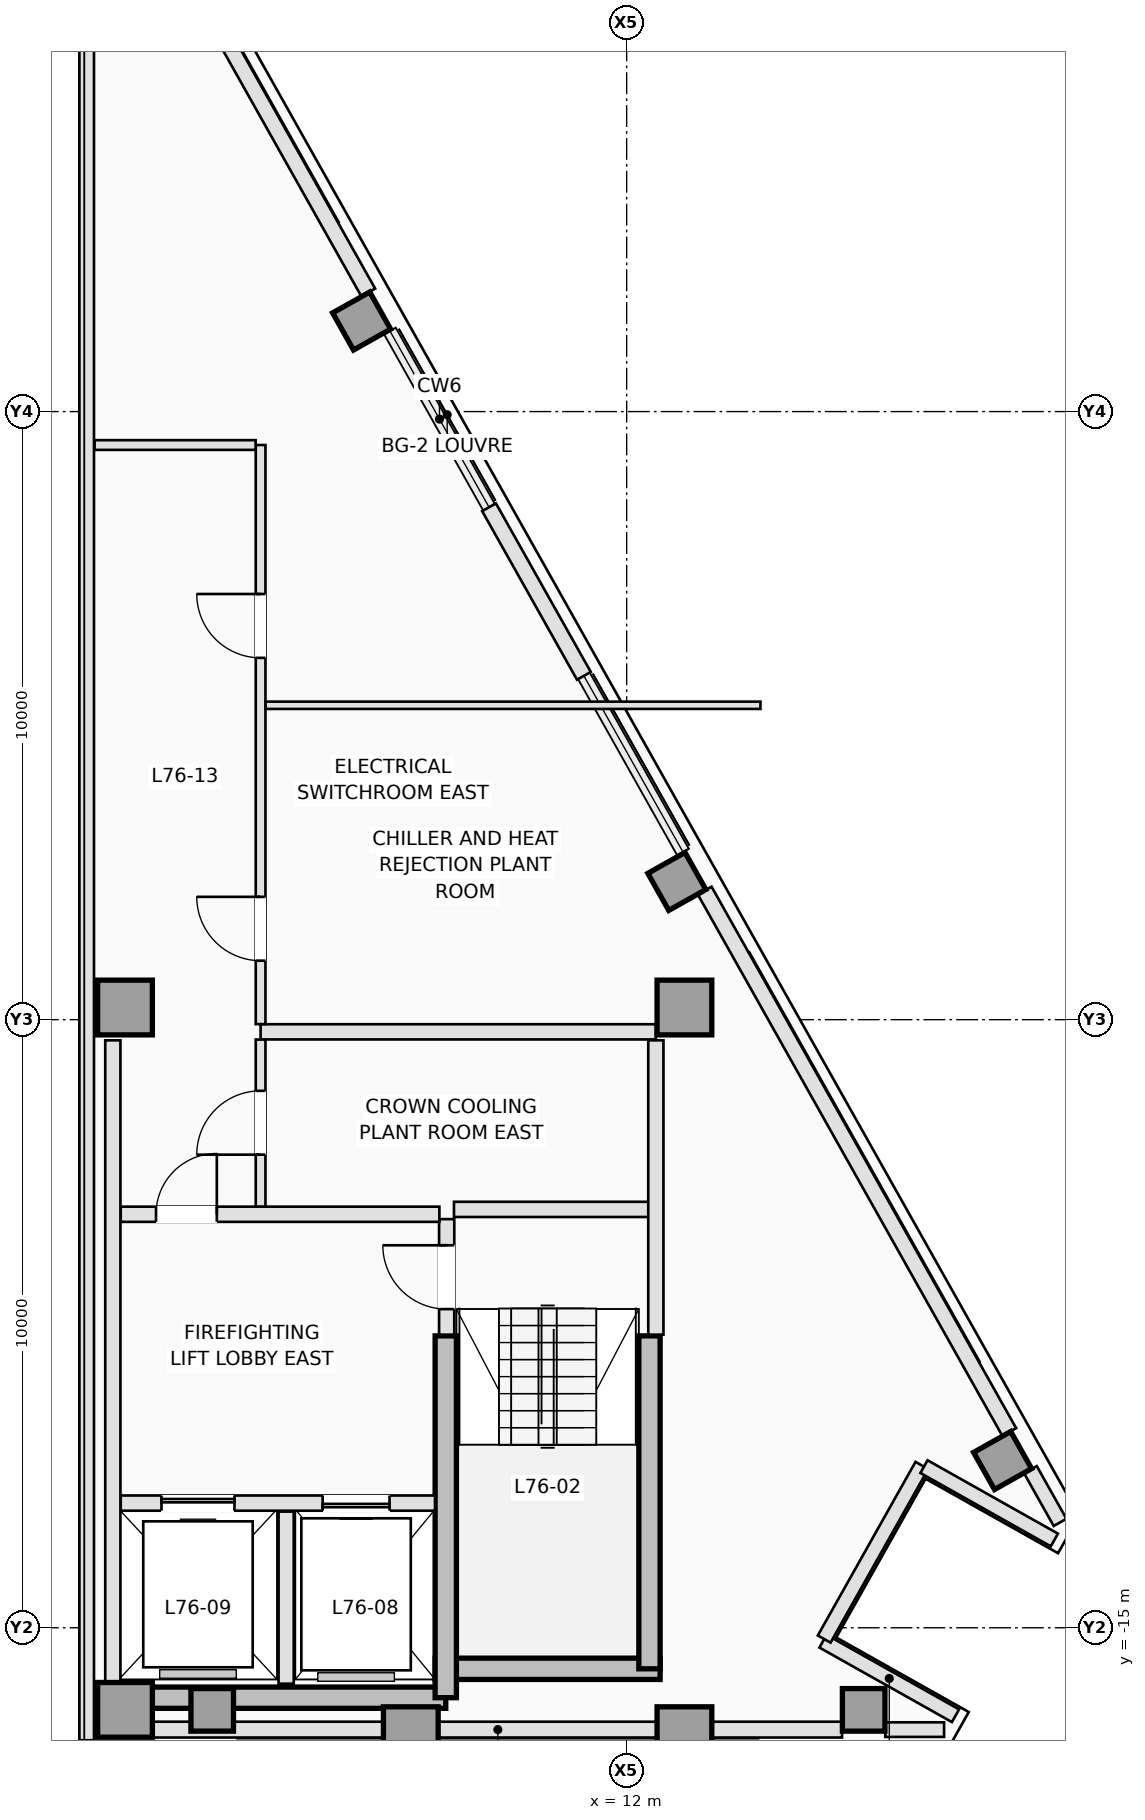
"""IFC4 building model, lengths in metres.
Left out: names, types, materials, properties, quantities, classifications, styles, units other than length and angle.
Written with IfcOpenShell. Run it as: python <this file> out.ifc"""

import sys

from ifc_helpers import new_model, si_unit, direction, frame, frame_2d, origin, origin_2d, place, context, subcontext, project, spatial, rectangle, extrude, element, fill, save


model = new_model("IFC4")
c1 = context("Model", 3, precision=1e-05, world=origin(), true_north=direction((0.0, 1.0)))
c2 = subcontext(c1, "Body", "Model", "MODEL_VIEW")
j1 = project(units=[si_unit("LENGTHUNIT", "METRE"), si_unit("PLANEANGLEUNIT", "RADIAN")], contexts=[c1])
p1 = place(None, origin())
s1 = spatial("IfcSite", under=j1, at=p1, CompositionType="ELEMENT")
p2 = place(p1, origin())
s2 = spatial("IfcBuilding", under=s1, at=p2, CompositionType="ELEMENT")
p3 = place(p2, frame((0.0, 0.0, 274.1)))
s3 = spatial("IfcBuildingStorey", under=s2, at=p3, CompositionType="ELEMENT", Elevation=274.1)
p4 = place(p3, frame((3.75, -16.15, 0.0), z_axis=(0.0, 0.0, 1.0), x_axis=(1.0, 0.0, 0.0)))
e1 = element("IfcWall", 1, at=p4, inside=s3, PredefinedType="SHEAR", context=c2, shape_type="SweptSolid", body=[
    extrude(rectangle(XDim=5.275, YDim=0.35, at=frame_2d((2.637, 0.0))), origin(), (0.0, 0.0, 1.0), 3.2),
])
p5 = place(p3, frame((8.85, -15.675, 0.0), z_axis=(0.0, 0.0, 1.0), x_axis=(1.0, 0.0, 0.0)))
e2 = element("IfcWall", 2, at=p5, inside=s3, PredefinedType="SHEAR", context=c2, shape_type="SweptSolid", body=[
    extrude(rectangle(XDim=3.7, YDim=0.35, at=frame_2d((1.85, 0.0))), origin(), (0.0, 0.0, 1.0), 3.2),
])
p6 = place(p3, frame((12.375, -15.675, 0.0), z_axis=(0.0, 0.0, 1.0), x_axis=(0.0, 1.0, 0.0)))
e3 = element("IfcWall", 3, at=p6, inside=s3, PredefinedType="SHEAR", context=c2, shape_type="SweptSolid", body=[
    extrude(rectangle(XDim=5.475, YDim=0.35, at=frame_2d((2.738, 0.0))), origin(), (0.0, 0.0, 1.0), 3.2),
])
p7 = place(p3, frame((9.025, -16.15, 0.0), z_axis=(0.0, 0.0, 1.0), x_axis=(0.0, 1.0, 0.0)))
e4 = element("IfcWall", 4, at=p7, inside=s3, PredefinedType="SHEAR", context=c2, shape_type="SweptSolid", body=[
    extrude(rectangle(XDim=5.95, YDim=0.35, at=frame_2d((2.975, 0.0))), origin(), (0.0, 0.0, 1.0), 3.2),
])
for number, where, z_axis, x_axis in (
    (5, (3.75, -16.35, 0.0), (0.0, 0.0, 1.0), (1.0, 0.0, 0.0)),
    (6, (8.45, -16.75, 0.0), (0.0, 0.0, 1.0), (1.0, 0.0, 0.0)),
    (7, (12.95, -16.75, 0.0), (0.0, 0.0, 1.0), (1.0, 0.0, 0.0)),
    (8, (3.75, -4.8, 0.0), (0.0, 0.0, 1.0), (1.0, 0.0, 0.0)),
    (9, (12.95, -4.8, 0.0), (0.0, 0.0, 1.0), (1.0, 0.0, 0.0)),
):
    element("IfcColumn", number, at=place(p3, frame(where, z_axis=z_axis, x_axis=x_axis)), inside=s3, PredefinedType="COLUMN", context=c2, shape_type="SweptSolid", body=[
        extrude(rectangle(XDim=0.9, YDim=0.9, at=origin_2d()), origin(), (0.0, 0.0, 1.0), 3.2),
    ])
for number, where, z_axis, x_axis in (
    (10, (5.184, -16.35, 0.0), (0.0, 0.0, 1.0), (0.0, 1.0, 0.0)),
    (11, (15.898, -16.35, 0.0), (0.0, 0.0, 1.0), (0.0, 1.0, 0.0)),
    (12, (18.182, -12.25, 0.0), (0.0, 0.0, 1.0), (0.872, 0.49, 0.0)),
    (13, (12.825, -2.727, 0.0), (0.0, 0.0, 1.0), (0.872, 0.49, 0.0)),
    (14, (7.642, 6.489, 0.0), (0.0, 0.0, 1.0), (0.872, 0.49, 0.0)),
):
    element("IfcColumn", number, at=place(p3, frame(where, z_axis=z_axis, x_axis=x_axis)), inside=s3, PredefinedType="COLUMN", context=c2, shape_type="SweptSolid", body=[
        extrude(rectangle(XDim=0.7, YDim=0.7, at=origin_2d()), origin(), (0.0, 0.0, 1.0), 3.2),
    ])
p8 = place(p3, frame((17.22, -16.675, 0.0), z_axis=(0.0, 0.0, 1.0), x_axis=(-1.0, 0.0, 0.0)))
e15 = element("IfcWall", 15, at=p8, inside=s3, PredefinedType="STANDARD", context=c2, shape_type="SweptSolid", body=[
    extrude(rectangle(XDim=0.967, YDim=0.24, at=frame_2d((0.484, 0.0))), origin(), (0.0, 0.0, 1.0), 2.92),
])
p9 = place(p3, frame((15.542, -16.675, 0.0), z_axis=(0.0, 0.0, 1.0), x_axis=(-1.0, 0.0, 0.0)))
e16 = element("IfcWall", 16, at=p9, inside=s3, PredefinedType="STANDARD", context=c2, shape_type="SweptSolid", body=[
    extrude(rectangle(XDim=11.323, YDim=0.26, at=frame_2d((5.661, 0.0))), origin(), (0.0, 0.0, 1.0), 2.204),
])
p10 = place(p3, frame((18.639, -12.4, 0.0), z_axis=(0.0, 0.0, 1.0), x_axis=(0.490261239633, -0.871575537125, 0.0)))
e17 = element("IfcWall", 17, at=p10, inside=s3, PredefinedType="STANDARD", context=c2, shape_type="SweptSolid", body=[
    extrude(rectangle(XDim=0.995, YDim=0.24, at=frame_2d((0.498, 0.0))), origin(), (0.0, 0.0, 1.0), 2.92),
])
p11 = place(p3, frame((2.742, 15.863, 0.0), z_axis=(0.0, 0.0, 1.0), x_axis=(0.490260105081, -0.871576175309, 0.0)))
e18 = element("IfcWall", 18, at=p11, inside=s3, PredefinedType="STANDARD", context=c2, shape_type="SweptSolid", body=[
    extrude(rectangle(XDim=10.217, YDim=0.26, at=frame_2d((5.108, 0.0))), origin(), (0.0, 0.0, 1.0), 2.92),
])
p12 = place(p3, frame((13.283, -2.877, 0.0), z_axis=(0.0, 0.0, 1.0), x_axis=(0.490270316201, -0.871570431492, 0.0)))
e19 = element("IfcWall", 19, at=p12, inside=s3, PredefinedType="STANDARD", context=c2, shape_type="SweptSolid", body=[
    extrude(rectangle(XDim=10.216, YDim=0.26, at=frame_2d((5.108, 0.0))), origin(), (0.0, 0.0, 1.0), 2.92),
])
p13 = place(p3, frame((9.737, 3.427, 0.0), z_axis=(0.0, 0.0, 1.0), x_axis=(0.490283106586, -0.871563236602, 0.0)))
e20 = element("IfcWall", 20, at=p13, inside=s3, PredefinedType="STANDARD", context=c2, shape_type="SweptSolid", body=[
    extrude(rectangle(XDim=3.18, YDim=0.26, at=frame_2d((1.59, 0.0))), origin(), (0.0, 0.0, 1.0), 2.92),
])
p14 = place(p3, frame((17.408, -16.447, 0.0), z_axis=(0.0, 0.0, 1.0), x_axis=(-0.871588577066, 0.490238056792, 0.0)))
e21 = element("IfcWall", 21, at=p14, inside=s3, PredefinedType="STANDARD", context=c2, shape_type="SweptSolid", body=[
    extrude(rectangle(XDim=2.5, YDim=0.24, at=frame_2d((1.25, 0.0))), origin(), (0.0, 0.0, 1.0), 2.92),
])
p15 = place(p3, frame((15.248, -15.186, 0.0), z_axis=(0.0, 0.0, 1.0), x_axis=(0.490293083368, 0.871557624258, 0.0)))
e22 = element("IfcWall", 22, at=p15, inside=s3, PredefinedType="STANDARD", context=c2, shape_type="SweptSolid", body=[
    extrude(rectangle(XDim=3.276, YDim=0.24, at=frame_2d((1.638, 0.0))), origin(), (0.0, 0.0, 1.0), 2.204),
])
p16 = place(p3, frame((16.889, -12.35, 0.0), z_axis=(0.0, 0.0, 1.0), x_axis=(0.87157023615, -0.490270663468, 0.0)))
e23 = element("IfcWall", 23, at=p16, inside=s3, PredefinedType="STANDARD", context=c2, shape_type="SweptSolid", body=[
    extrude(rectangle(XDim=2.46, YDim=0.24, at=frame_2d((1.23, 0.0))), origin(), (0.0, 0.0, 1.0), 2.92),
])
p17 = place(p3, frame((3.12, -16.85, 0.0), z_axis=(0.0, 0.0, 1.0), x_axis=(0.0, 1.0, 0.0)))
e24 = element("IfcWall", 24, at=p17, inside=s3, PredefinedType="STANDARD", context=c2, shape_type="SweptSolid", body=[
    extrude(rectangle(XDim=34.05, YDim=0.24, at=frame_2d((17.025, 0.0))), origin(), (0.0, 0.0, 1.0), 2.204),
])
p18 = place(p3, frame((9.04, -10.18, 0.0), z_axis=(0.0, 0.0, 1.0), x_axis=(0.0, 1.0, 0.0)))
e25 = element("IfcWall", 25, at=p18, inside=s3, PredefinedType="PARTITIONING", context=c2, shape_type="SweptSolid", body=[
    extrude(rectangle(XDim=1.9, YDim=0.25, at=frame_2d((0.95, 0.0))), origin(), (0.0, 0.0, 1.0), 2.92),
])
p19 = place(p18, frame((0.42, 0.0, 0.0)))
e26 = element("IfcOpeningElement", 26, at=p19, cuts=e25, PredefinedType="OPENING", context=c2, shape_type="SweptSolid", body=[
    extrude(rectangle(XDim=1.05, YDim=2.15, at=frame_2d((0.525, 1.075))), frame((0.0, 0.135, 0.0), z_axis=(0.0, -1.0, 0.0), x_axis=(1.0, 0.0, 0.0)), (0.0, 0.0, 1.0), 0.27),
])
p20 = place(p3, frame((9.16, -8.12, 0.0), z_axis=(0.0, 0.0, 1.0), x_axis=(1.0, 0.0, 0.0)))
e27 = element("IfcWall", 27, at=p20, inside=s3, PredefinedType="PARTITIONING", context=c2, shape_type="SweptSolid", body=[
    extrude(rectangle(XDim=3.22, YDim=0.25, at=frame_2d((1.61, 0.0))), origin(), (0.0, 0.0, 1.0), 2.92),
])
p21 = place(p3, frame((12.48, -10.18, 0.0), z_axis=(0.0, 0.0, 1.0), x_axis=(0.0, 1.0, 0.0)))
e28 = element("IfcWall", 28, at=p21, inside=s3, PredefinedType="PARTITIONING", context=c2, shape_type="SweptSolid", body=[
    extrude(rectangle(XDim=4.84, YDim=0.25, at=frame_2d((2.42, 0.0))), origin(), (0.0, 0.0, 1.0), 2.92),
])
p22 = place(p3, frame((3.68, -12.95, 0.0), z_axis=(0.0, 0.0, 1.0), x_axis=(1.0, 0.0, 0.0)))
e29 = element("IfcWall", 29, at=p22, inside=s3, PredefinedType="PARTITIONING", context=c2, shape_type="SweptSolid", body=[
    extrude(rectangle(XDim=5.168, YDim=0.25, at=frame_2d((2.584, 0.0))), origin(), (0.0, 0.0, 1.0), 2.92),
])
p23 = place(p22, frame((3.32, 0.0, 0.0)))
e30 = element("IfcOpeningElement", 30, at=p23, cuts=e29, PredefinedType="OPENING", context=c2, shape_type="SweptSolid", body=[
    extrude(rectangle(XDim=1.1, YDim=2.15, at=frame_2d((0.55, 1.075))), frame((0.0, 0.135, 0.0), z_axis=(0.0, -1.0, 0.0), x_axis=(1.0, 0.0, 0.0)), (0.0, 0.0, 1.0), 0.27),
])
p24 = place(p22, frame((0.67, 0.0, 0.0)))
e31 = element("IfcOpeningElement", 31, at=p24, cuts=e29, PredefinedType="OPENING", context=c2, shape_type="SweptSolid", body=[
    extrude(rectangle(XDim=1.2, YDim=2.15, at=frame_2d((0.6, 1.075))), frame((0.0, 0.135, 0.0), z_axis=(0.0, -1.0, 0.0), x_axis=(1.0, 0.0, 0.0)), (0.0, 0.0, 1.0), 0.27),
])
p25 = place(p3, frame((6.4, -15.92, 0.0), z_axis=(0.0, 0.0, 1.0), x_axis=(0.0, 1.0, 0.0)))
e32 = element("IfcWall", 32, at=p25, inside=s3, PredefinedType="PARTITIONING", context=c2, shape_type="SweptSolid", body=[
    extrude(rectangle(XDim=2.83, YDim=0.25, at=frame_2d((1.415, 0.0))), origin(), (0.0, 0.0, 1.0), 2.92),
])
p26 = place(p3, frame((3.68, -8.2, 0.0), z_axis=(0.0, 0.0, 1.0), x_axis=(1.0, 0.0, 0.0)))
e33 = element("IfcWall", 33, at=p26, inside=s3, PredefinedType="PARTITIONING", context=c2, shape_type="SweptSolid", body=[
    extrude(rectangle(XDim=5.24, YDim=0.25, at=frame_2d((2.62, 0.0))), origin(), (0.0, 0.0, 1.0), 2.92),
])
p27 = place(p26, frame((0.58, 0.0, 0.0)))
e34 = element("IfcOpeningElement", 34, at=p27, cuts=e33, PredefinedType="OPENING", context=c2, shape_type="SweptSolid", body=[
    extrude(rectangle(XDim=1.0, YDim=2.15, at=frame_2d((0.5, 1.075))), frame((0.0, 0.135, 0.0), z_axis=(0.0, -1.0, 0.0), x_axis=(1.0, 0.0, 0.0)), (0.0, 0.0, 1.0), 0.27),
])
p28 = place(p3, frame((3.55, -15.898, 0.0), z_axis=(0.0, 0.0, 1.0), x_axis=(0.0, 1.0, 0.0)))
e35 = element("IfcWall", 35, at=p28, inside=s3, PredefinedType="PARTITIONING", context=c2, shape_type="SweptSolid", body=[
    extrude(rectangle(XDim=10.558, YDim=0.25, at=frame_2d((5.279, 0.0))), origin(), (0.0, 0.0, 1.0), 2.92),
])
p29 = place(p3, frame((5.98, -5.2, 0.0), z_axis=(0.0, 0.0, 1.0), x_axis=(1.0, 0.0, 0.0)))
e36 = element("IfcWall", 36, at=p29, inside=s3, PredefinedType="PARTITIONING", context=c2, shape_type="SweptSolid", body=[
    extrude(rectangle(XDim=6.5, YDim=0.25, at=frame_2d((3.25, 0.0))), origin(), (0.0, 0.0, 1.0), 2.92),
])
p30 = place(p3, frame((5.98, -8.073, 0.0), z_axis=(0.0, 0.0, 1.0), x_axis=(0.0, 1.0, 0.0)))
e37 = element("IfcWall", 37, at=p30, inside=s3, PredefinedType="PARTITIONING", context=c2, shape_type="SweptSolid", body=[
    extrude(rectangle(XDim=2.746, YDim=0.16, at=frame_2d((1.373, 0.0))), origin(), (0.0, 0.0, 1.0), 2.92),
])
p31 = place(p30, frame((0.853, 0.0, 0.0)))
e38 = element("IfcOpeningElement", 38, at=p31, cuts=e37, PredefinedType="OPENING", context=c2, shape_type="SweptSolid", body=[
    extrude(rectangle(XDim=1.05, YDim=2.12, at=frame_2d((0.525, 1.06))), frame((0.0, 0.09, 0.0), z_axis=(0.0, -1.0, 0.0), x_axis=(1.0, 0.0, 0.0)), (0.0, 0.0, 1.0), 0.18),
])
p32 = place(p3, frame((5.98, -5.073, 0.0), z_axis=(0.0, 0.0, 1.0), x_axis=(0.0, 1.0, 0.0)))
e39 = element("IfcWall", 39, at=p32, inside=s3, PredefinedType="PARTITIONING", context=c2, shape_type="SweptSolid", body=[
    extrude(rectangle(XDim=9.523, YDim=0.16, at=frame_2d((4.761, 0.0))), origin(), (0.0, 0.0, 1.0), 2.92),
])
p33 = place(p32, frame((1.043, 0.0, 0.0)))
e40 = element("IfcOpeningElement", 40, at=p33, cuts=e39, PredefinedType="OPENING", context=c2, shape_type="SweptSolid", body=[
    extrude(rectangle(XDim=1.05, YDim=2.12, at=frame_2d((0.525, 1.06))), frame((0.0, 0.09, 0.0), z_axis=(0.0, -1.0, 0.0), x_axis=(1.0, 0.0, 0.0)), (0.0, 0.0, 1.0), 0.18),
])
p34 = place(p32, frame((6.023, 0.0, 0.0)))
e41 = element("IfcOpeningElement", 41, at=p34, cuts=e39, PredefinedType="OPENING", context=c2, shape_type="SweptSolid", body=[
    extrude(rectangle(XDim=1.05, YDim=2.12, at=frame_2d((0.525, 1.06))), frame((0.0, 0.09, 0.0), z_axis=(0.0, -1.0, 0.0), x_axis=(1.0, 0.0, 0.0)), (0.0, 0.0, 1.0), 0.18),
])
p35 = place(p3, frame((3.25, 4.45, 0.0), z_axis=(0.0, 0.0, 1.0), x_axis=(1.0, 0.0, 0.0)))
e42 = element("IfcWall", 42, at=p35, inside=s3, PredefinedType="PARTITIONING", context=c2, shape_type="SweptSolid", body=[
    extrude(rectangle(XDim=2.648, YDim=0.16, at=frame_2d((1.324, 0.0))), origin(), (0.0, 0.0, 1.0), 2.92),
])
p36 = place(p3, frame((6.062, 0.17, 0.0), z_axis=(0.0, 0.0, 1.0), x_axis=(1.0, 0.0, 0.0)))
e43 = element("IfcWall", 43, at=p36, inside=s3, PredefinedType="PARTITIONING", context=c2, shape_type="SweptSolid", body=[
    extrude(rectangle(XDim=8.138, YDim=0.12, at=frame_2d((4.069, 0.0))), origin(), (0.0, 0.0, 1.0), 2.92),
])
p37 = place(p23, origin())
e44 = element("IfcDoor", 44, at=p37, inside=s3, OperationType="SLIDING_TO_RIGHT", PredefinedType="DOOR", context=c2, shape_type="SweptSolid", body=[
    extrude(rectangle(XDim=1.1, YDim=2.15, at=frame_2d((0.55, 1.075))), frame((0.0, 0.025, 0.0), z_axis=(0.0, -1.0, 0.0), x_axis=(1.0, 0.0, 0.0)), (0.0, 0.0, 1.0), 0.05),
])
fill(e30, e44)
p38 = place(p24, origin())
e45 = element("IfcDoor", 45, at=p38, inside=s3, OperationType="SLIDING_TO_LEFT", PredefinedType="DOOR", context=c2, shape_type="SweptSolid", body=[
    extrude(rectangle(XDim=1.2, YDim=2.15, at=frame_2d((0.6, 1.075))), frame((0.0, 0.025, 0.0), z_axis=(0.0, -1.0, 0.0), x_axis=(1.0, 0.0, 0.0)), (0.0, 0.0, 1.0), 0.05),
])
fill(e31, e45)
p39 = place(p19, origin())
e46 = element("IfcDoor", 46, at=p39, inside=s3, OperationType="SINGLE_SWING_RIGHT", PredefinedType="DOOR", context=c2, shape_type="SweptSolid", body=[
    extrude(rectangle(XDim=1.05, YDim=2.15, at=frame_2d((0.525, 1.075))), frame((0.0, 0.025, 0.0), z_axis=(0.0, -1.0, 0.0), x_axis=(1.0, 0.0, 0.0)), (0.0, 0.0, 1.0), 0.05),
])
fill(e26, e46)
p40 = place(p27, origin())
e47 = element("IfcDoor", 47, at=p40, inside=s3, OperationType="SINGLE_SWING_RIGHT", PredefinedType="DOOR", context=c2, shape_type="SweptSolid", body=[
    extrude(rectangle(XDim=1.0, YDim=2.15, at=frame_2d((0.5, 1.075))), frame((0.0, 0.025, 0.0), z_axis=(0.0, -1.0, 0.0), x_axis=(1.0, 0.0, 0.0)), (0.0, 0.0, 1.0), 0.05),
])
fill(e34, e47)
p41 = place(p31, origin())
e48 = element("IfcDoor", 48, at=p41, inside=s3, OperationType="SINGLE_SWING_LEFT", PredefinedType="DOOR", context=c2, shape_type="SweptSolid", body=[
    extrude(rectangle(XDim=1.05, YDim=2.12, at=frame_2d((0.525, 1.06))), frame((0.0, 0.025, 0.0), z_axis=(0.0, -1.0, 0.0), x_axis=(1.0, 0.0, 0.0)), (0.0, 0.0, 1.0), 0.05),
])
fill(e38, e48)
p42 = place(p33, origin())
e49 = element("IfcDoor", 49, at=p42, inside=s3, OperationType="SINGLE_SWING_RIGHT", PredefinedType="DOOR", context=c2, shape_type="SweptSolid", body=[
    extrude(rectangle(XDim=1.05, YDim=2.12, at=frame_2d((0.525, 1.06))), frame((0.0, 0.025, 0.0), z_axis=(0.0, -1.0, 0.0), x_axis=(1.0, 0.0, 0.0)), (0.0, 0.0, 1.0), 0.05),
])
fill(e40, e49)
p43 = place(p34, origin())
e50 = element("IfcDoor", 50, at=p43, inside=s3, OperationType="SINGLE_SWING_RIGHT", PredefinedType="DOOR", context=c2, shape_type="SweptSolid", body=[
    extrude(rectangle(XDim=1.05, YDim=2.12, at=frame_2d((0.525, 1.06))), frame((0.0, 0.025, 0.0), z_axis=(0.0, -1.0, 0.0), x_axis=(1.0, 0.0, 0.0)), (0.0, 0.0, 1.0), 0.05),
])
fill(e41, e50)
save(model, sys.argv[1])
